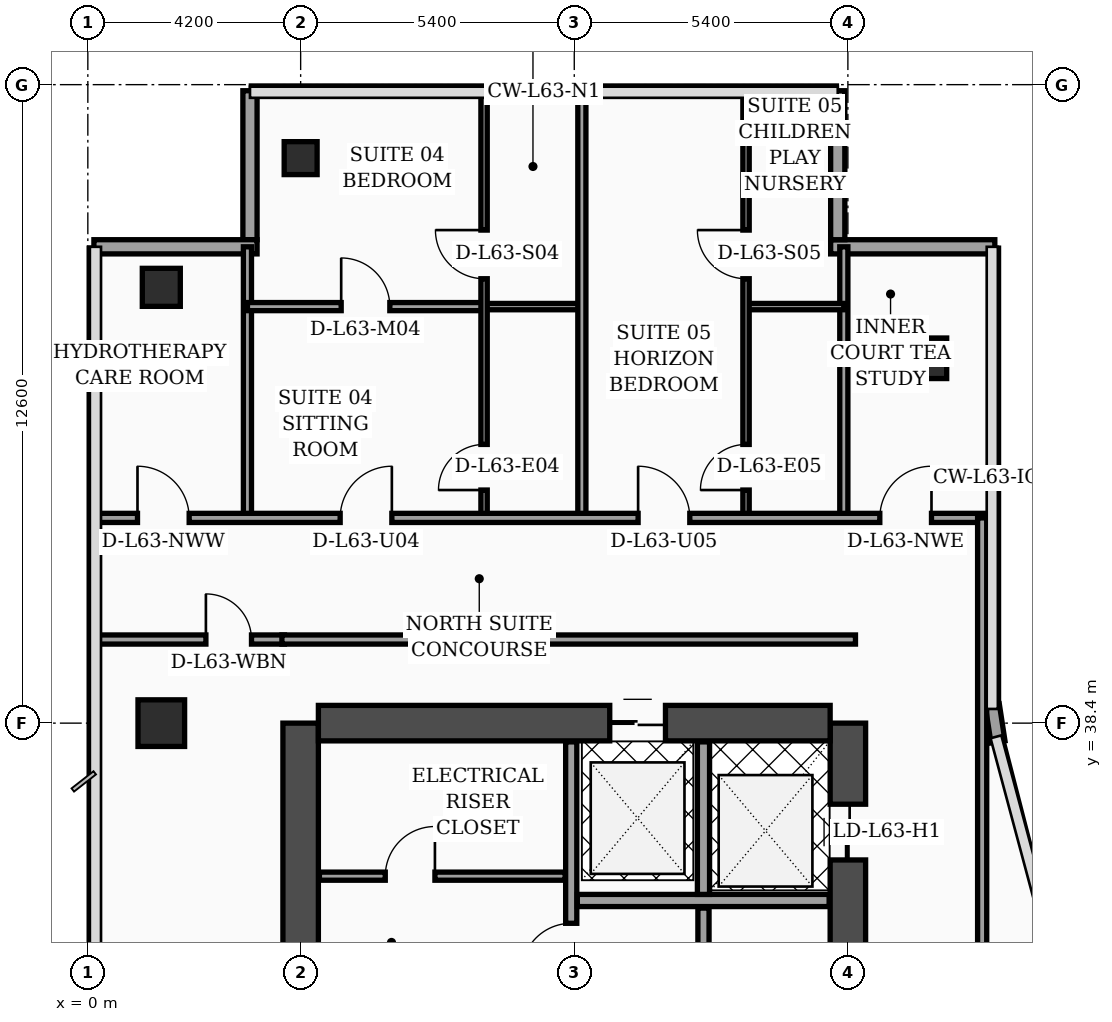
"""IFC4 building model, lengths in metres.
Left out: names, types, materials, properties, quantities, classifications, styles, units other than length and angle.
Written with IfcOpenShell. Run it as: python <this file> out.ifc"""

import sys

from ifc_helpers import new_model, si_unit, direction, frame, frame_2d, origin, origin_2d, place, context, subcontext, project, spatial, rectangle, hollow_rectangle, extrude, element, fill, save


model = new_model("IFC4")
c1 = context("Model", 3, precision=1e-05, world=origin(), true_north=direction((0.0, 1.0)))
c2 = subcontext(c1, "Body", "Model", "MODEL_VIEW")
j1 = project(units=[si_unit("LENGTHUNIT", "METRE"), si_unit("PLANEANGLEUNIT", "RADIAN")], contexts=[c1])
p1 = place(None, origin())
s1 = spatial("IfcSite", under=j1, at=p1, CompositionType="ELEMENT")
p2 = place(p1, origin())
s2 = spatial("IfcBuilding", under=s1, at=p2, CompositionType="ELEMENT")
p3 = place(p2, frame((0.0, 0.0, 255.2)))
s3 = spatial("IfcBuildingStorey", under=s2, at=p3, CompositionType="ELEMENT", Elevation=255.2)
p4 = place(p3, frame((4.2, 16.8, 0.0), z_axis=(0.0, 0.0, 1.0), x_axis=(0.0, 1.0, 0.0)))
e1 = element("IfcWall", 1, at=p4, inside=s3, PredefinedType="SHEAR", context=c2, shape_type="SweptSolid", body=[
    extrude(rectangle(XDim=21.6, YDim=0.7, at=frame_2d((10.8, 0.0))), origin(), (0.0, 0.0, 1.0), 3.56),
])
p5 = place(p3, frame((15.0, 16.8, 0.0), z_axis=(0.0, 0.0, 1.0), x_axis=(0.0, 1.0, 0.0)))
e2 = element("IfcWall", 2, at=p5, inside=s3, PredefinedType="SHEAR", context=c2, shape_type="SweptSolid", body=[
    extrude(rectangle(XDim=21.6, YDim=0.7, at=frame_2d((10.8, 0.0))), origin(), (0.0, 0.0, 1.0), 3.56),
])
p6 = place(p5, frame((8.65, 0.0, 0.0)))
e3 = element("IfcOpeningElement", 3, at=p6, cuts=e2, PredefinedType="OPENING", context=c2, shape_type="SweptSolid", body=[
    extrude(rectangle(XDim=1.1, YDim=2.2, at=frame_2d((0.55, 1.1))), frame((0.0, 0.36, 0.0), z_axis=(0.0, -1.0, 0.0), x_axis=(1.0, 0.0, 0.0)), (0.0, 0.0, 1.0), 0.72),
])
p7 = place(p5, frame((18.9, 0.0, 0.0)))
e4 = element("IfcOpeningElement", 4, at=p7, cuts=e2, PredefinedType="OPENING", context=c2, shape_type="SweptSolid", body=[
    extrude(rectangle(XDim=1.1, YDim=2.2, at=frame_2d((0.55, 1.1))), frame((0.0, 0.36, 0.0), z_axis=(0.0, -1.0, 0.0), x_axis=(1.0, 0.0, 0.0)), (0.0, 0.0, 1.0), 0.72),
])
p8 = place(p3, frame((4.55, 38.4, 0.0), z_axis=(0.0, 0.0, 1.0), x_axis=(1.0, 0.0, 0.0)))
e5 = element("IfcWall", 5, at=p8, inside=s3, PredefinedType="SHEAR", context=c2, shape_type="SweptSolid", body=[
    extrude(rectangle(XDim=10.1, YDim=0.7, at=frame_2d((5.05, 0.0))), origin(), (0.0, 0.0, 1.0), 3.56),
])
p9 = place(p8, frame((5.75, 0.0, 0.0)))
e6 = element("IfcOpeningElement", 6, at=p9, cuts=e5, PredefinedType="OPENING", context=c2, shape_type="SweptSolid", body=[
    extrude(rectangle(XDim=1.1, YDim=2.2, at=frame_2d((0.55, 1.1))), frame((0.0, 0.36, 0.0), z_axis=(0.0, -1.0, 0.0), x_axis=(1.0, 0.0, 0.0)), (0.0, 0.0, 1.0), 0.72),
])
p10 = place(p3, frame((1.45, 38.4, 0.0), z_axis=(0.0, 0.0, 1.0), x_axis=(1.0, 0.0, 0.0)))
e7 = element("IfcColumn", 7, at=p10, inside=s3, PredefinedType="COLUMN", context=c2, shape_type="SweptSolid", body=[
    extrude(rectangle(XDim=0.92, YDim=0.92, at=origin_2d()), origin(), (0.0, 0.0, 1.0), 3.56),
])
p11 = place(p3, frame((1.45, 47.0, 0.0), z_axis=(0.0, 0.0, 1.0), x_axis=(1.0, 0.0, 0.0)))
e8 = element("IfcColumn", 8, at=p11, inside=s3, PredefinedType="COLUMN", context=c2, shape_type="SweptSolid", body=[
    extrude(hollow_rectangle(XDim=0.75, YDim=0.75, WallThickness=0.032, at=origin_2d()), origin(), (0.0, 0.0, 1.0), 3.56),
])
p12 = place(p3, frame((4.2, 49.55, 0.0), z_axis=(0.0, 0.0, 1.0), x_axis=(1.0, 0.0, 0.0)))
e9 = element("IfcColumn", 9, at=p12, inside=s3, PredefinedType="COLUMN", context=c2, shape_type="SweptSolid", body=[
    extrude(hollow_rectangle(XDim=0.65, YDim=0.65, WallThickness=0.028, at=origin_2d()), origin(), (0.0, 0.0, 1.0), 3.56),
])
p13 = place(p3, frame((16.55, 45.6, 0.0), z_axis=(0.0, 0.0, 1.0), x_axis=(1.0, 0.0, 0.0)))
e10 = element("IfcColumn", 10, at=p13, inside=s3, PredefinedType="COLUMN", context=c2, shape_type="SweptSolid", body=[
    extrude(rectangle(XDim=0.8, YDim=0.8, at=origin_2d()), origin(), (0.0, 0.0, 1.0), 3.56),
])
p14 = place(p3, frame((17.962, 38.03, 0.0), z_axis=(0.0, 0.0, 1.0), x_axis=(-0.15141125477, 0.988470855377, 0.0)))
e11 = element("IfcWall", 11, at=p14, inside=s3, PredefinedType="SOLIDWALL", context=c2, shape_type="SweptSolid", body=[
    extrude(rectangle(XDim=0.739, YDim=0.28, at=frame_2d((0.369, 0.0))), origin(), (0.0, 0.0, 1.0), 3.56),
])
p15 = place(p3, frame((17.9, 47.8, 0.0), z_axis=(0.0, 0.0, 1.0), x_axis=(-1.0, 0.0, 0.0)))
e12 = element("IfcWall", 12, at=p15, inside=s3, PredefinedType="SOLIDWALL", context=c2, shape_type="SweptSolid", body=[
    extrude(rectangle(XDim=3.24, YDim=0.28, at=frame_2d((1.62, 0.0))), origin(), (0.0, 0.0, 1.0), 3.56),
])
p16 = place(p3, frame((14.8, 47.94, 0.0), z_axis=(0.0, 0.0, 1.0), x_axis=(0.0, 1.0, 0.0)))
e13 = element("IfcWall", 13, at=p16, inside=s3, PredefinedType="SOLIDWALL", context=c2, shape_type="SweptSolid", body=[
    extrude(rectangle(XDim=2.94, YDim=0.28, at=frame_2d((1.47, 0.0))), origin(), (0.0, 0.0, 1.0), 3.56),
])
p17 = place(p3, frame((3.2, 50.88, 0.0), z_axis=(0.0, 0.0, 1.0), x_axis=(0.0, -1.0, 0.0)))
e14 = element("IfcWall", 14, at=p17, inside=s3, PredefinedType="SOLIDWALL", context=c2, shape_type="SweptSolid", body=[
    extrude(rectangle(XDim=2.94, YDim=0.28, at=frame_2d((1.47, 0.0))), origin(), (0.0, 0.0, 1.0), 3.09),
])
p18 = place(p3, frame((3.34, 47.8, 0.0), z_axis=(0.0, 0.0, 1.0), x_axis=(-1.0, 0.0, 0.0)))
e15 = element("IfcWall", 15, at=p18, inside=s3, PredefinedType="SOLIDWALL", context=c2, shape_type="SweptSolid", body=[
    extrude(rectangle(XDim=3.22, YDim=0.28, at=frame_2d((1.61, 0.0))), origin(), (0.0, 0.0, 1.0), 3.09),
])
p19 = place(p3, frame((4.57, 35.38, 0.0), z_axis=(0.0, 0.0, 1.0), x_axis=(1.0, 0.0, 0.0)))
e16 = element("IfcWall", 16, at=p19, inside=s3, PredefinedType="PARTITIONING", context=c2, shape_type="SweptSolid", body=[
    extrude(rectangle(XDim=4.85, YDim=0.16, at=frame_2d((2.425, 0.0))), origin(), (0.0, 0.0, 1.0), 3.56),
])
p20 = place(p19, frame((1.3, 0.0, 0.0)))
e17 = element("IfcOpeningElement", 17, at=p20, cuts=e16, PredefinedType="OPENING", context=c2, shape_type="SweptSolid", body=[
    extrude(rectangle(XDim=0.98, YDim=2.15, at=frame_2d((0.49, 1.075))), frame((0.0, 0.09, 0.0), z_axis=(0.0, -1.0, 0.0), x_axis=(1.0, 0.0, 0.0)), (0.0, 0.0, 1.0), 0.18),
])
p21 = place(p3, frame((9.54, 32.92, 0.0), z_axis=(0.0, 0.0, 1.0), x_axis=(0.0, 1.0, 0.0)))
e18 = element("IfcWall", 18, at=p21, inside=s3, PredefinedType="SOLIDWALL", context=c2, shape_type="SweptSolid", body=[
    extrude(rectangle(XDim=5.11, YDim=0.22, at=frame_2d((2.555, 0.0))), origin(), (0.0, 0.0, 1.0), 3.56),
])
p22 = place(p21, frame((0.55, 0.0, 0.0)))
e19 = element("IfcOpeningElement", 19, at=p22, cuts=e18, PredefinedType="OPENING", context=c2, shape_type="SweptSolid", body=[
    extrude(rectangle(XDim=0.98, YDim=2.15, at=frame_2d((0.49, 1.075))), frame((0.0, 0.12, 0.0), z_axis=(0.0, -1.0, 0.0), x_axis=(1.0, 0.0, 0.0)), (0.0, 0.0, 1.0), 0.24),
])
p23 = place(p3, frame((12.15, 27.0, 0.0), z_axis=(0.0, 0.0, 1.0), x_axis=(0.0, 1.0, 0.0)))
e20 = element("IfcWall", 20, at=p23, inside=s3, PredefinedType="SOLIDWALL", context=c2, shape_type="SweptSolid", body=[
    extrude(rectangle(XDim=7.75, YDim=0.22, at=frame_2d((3.875, 0.0))), origin(), (0.0, 0.0, 1.0), 3.56),
])
p24 = place(p23, frame((0.8, 0.0, 0.0)))
e21 = element("IfcOpeningElement", 21, at=p24, cuts=e20, PredefinedType="OPENING", context=c2, shape_type="SweptSolid", body=[
    extrude(rectangle(XDim=0.98, YDim=2.15, at=frame_2d((0.49, 1.075))), frame((0.0, 0.12, 0.0), z_axis=(0.0, -1.0, 0.0), x_axis=(1.0, 0.0, 0.0)), (0.0, 0.0, 1.0), 0.24),
])
p25 = place(p3, frame((9.66, 34.9, 0.0), z_axis=(0.0, 0.0, 1.0), x_axis=(1.0, 0.0, 0.0)))
e22 = element("IfcWall", 22, at=p25, inside=s3, PredefinedType="SOLIDWALL", context=c2, shape_type="SweptSolid", body=[
    extrude(rectangle(XDim=4.97, YDim=0.24, at=frame_2d((2.485, 0.0))), origin(), (0.0, 0.0, 1.0), 3.56),
])
p26 = place(p3, frame((12.15, 35.02, 0.0), z_axis=(0.0, 0.0, 1.0), x_axis=(0.0, 1.0, 0.0)))
e23 = element("IfcWall", 23, at=p26, inside=s3, PredefinedType="SOLIDWALL", context=c2, shape_type="SweptSolid", body=[
    extrude(rectangle(XDim=3.01, YDim=0.24, at=frame_2d((1.505, 0.0))), origin(), (0.0, 0.0, 1.0), 3.56),
])
p27 = place(p3, frame((0.08, 40.05, 0.0), z_axis=(0.0, 0.0, 1.0), x_axis=(1.0, 0.0, 0.0)))
e24 = element("IfcWall", 24, at=p27, inside=s3, PredefinedType="PARTITIONING", context=c2, shape_type="SweptSolid", body=[
    extrude(rectangle(XDim=3.8, YDim=0.18, at=frame_2d((1.9, 0.0))), origin(), (0.0, 0.0, 1.0), 2.99),
])
p28 = place(p27, frame((2.25, 0.0, 0.0)))
e25 = element("IfcOpeningElement", 25, at=p28, cuts=e24, PredefinedType="OPENING", context=c2, shape_type="SweptSolid", body=[
    extrude(rectangle(XDim=0.9, YDim=2.15, at=frame_2d((0.45, 1.075))), frame((0.0, 0.1, 0.0), z_axis=(0.0, -1.0, 0.0), x_axis=(1.0, 0.0, 0.0)), (0.0, 0.0, 1.0), 0.2),
])
p29 = place(p3, frame((3.15, 42.45, 0.0), z_axis=(0.0, 0.0, 1.0), x_axis=(0.0, 1.0, 0.0)))
e26 = element("IfcWall", 26, at=p29, inside=s3, PredefinedType="PARTITIONING", context=c2, shape_type="SweptSolid", body=[
    extrude(rectangle(XDim=5.35, YDim=0.16, at=frame_2d((2.675, 0.0))), origin(), (0.0, 0.0, 1.0), 3.14),
])
p30 = place(p3, frame((14.92, 42.45, 0.0), z_axis=(0.0, 0.0, 1.0), x_axis=(0.0, 1.0, 0.0)))
e27 = element("IfcWall", 27, at=p30, inside=s3, PredefinedType="PARTITIONING", context=c2, shape_type="SweptSolid", body=[
    extrude(rectangle(XDim=5.35, YDim=0.16, at=frame_2d((2.675, 0.0))), origin(), (0.0, 0.0, 1.0), 3.09),
])
p31 = place(p3, frame((7.82, 46.62, 0.0), z_axis=(0.0, 0.0, 1.0), x_axis=(1.0, 0.0, 0.0)))
e28 = element("IfcWall", 28, at=p31, inside=s3, PredefinedType="PARTITIONING", context=c2, shape_type="SweptSolid", body=[
    extrude(rectangle(XDim=1.93, YDim=0.125, at=frame_2d((0.965, 0.0))), origin(), (0.0, 0.0, 1.0), 3.56),
])
p32 = place(p3, frame((3.15, 46.62, 0.0), z_axis=(0.0, 0.0, 1.0), x_axis=(1.0, 0.0, 0.0)))
e29 = element("IfcWall", 29, at=p32, inside=s3, PredefinedType="PARTITIONING", context=c2, shape_type="SweptSolid", body=[
    extrude(rectangle(XDim=4.67, YDim=0.16, at=frame_2d((2.335, 0.0))), origin(), (0.0, 0.0, 1.0), 2.99),
])
p33 = place(p32, frame((1.85, 0.0, 0.0)))
e30 = element("IfcOpeningElement", 30, at=p33, cuts=e29, PredefinedType="OPENING", context=c2, shape_type="SweptSolid", body=[
    extrude(rectangle(XDim=0.96, YDim=2.2, at=frame_2d((0.48, 1.1))), frame((0.0, 0.09, 0.0), z_axis=(0.0, -1.0, 0.0), x_axis=(1.0, 0.0, 0.0)), (0.0, 0.0, 1.0), 0.18),
])
p34 = place(p3, frame((7.82, 42.45, 0.0), z_axis=(0.0, 0.0, 1.0), x_axis=(0.0, 1.0, 0.0)))
e31 = element("IfcWall", 31, at=p34, inside=s3, PredefinedType="PARTITIONING", context=c2, shape_type="SweptSolid", body=[
    extrude(rectangle(XDim=8.49, YDim=0.125, at=frame_2d((4.245, 0.0))), origin(), (0.0, 0.0, 1.0), 3.09),
])
p35 = place(p34, frame((0.55, 0.0, 0.0)))
e32 = element("IfcOpeningElement", 32, at=p35, cuts=e31, PredefinedType="OPENING", context=c2, shape_type="SweptSolid", body=[
    extrude(rectangle(XDim=0.9, YDim=2.15, at=frame_2d((0.45, 1.075))), frame((0.0, 0.073, 0.0), z_axis=(0.0, -1.0, 0.0), x_axis=(1.0, 0.0, 0.0)), (0.0, 0.0, 1.0), 0.145),
])
p36 = place(p34, frame((4.72, 0.0, 0.0)))
e33 = element("IfcOpeningElement", 33, at=p36, cuts=e31, PredefinedType="OPENING", context=c2, shape_type="SweptSolid", body=[
    extrude(rectangle(XDim=0.96, YDim=2.2, at=frame_2d((0.48, 1.1))), frame((0.0, 0.073, 0.0), z_axis=(0.0, -1.0, 0.0), x_axis=(1.0, 0.0, 0.0)), (0.0, 0.0, 1.0), 0.145),
])
p37 = place(p3, frame((12.99, 46.62, 0.0), z_axis=(0.0, 0.0, 1.0), x_axis=(1.0, 0.0, 0.0)))
e34 = element("IfcWall", 34, at=p37, inside=s3, PredefinedType="PARTITIONING", context=c2, shape_type="SweptSolid", body=[
    extrude(rectangle(XDim=1.93, YDim=0.125, at=frame_2d((0.965, 0.0))), origin(), (0.0, 0.0, 1.0), 3.09),
])
p38 = place(p3, frame((12.99, 42.45, 0.0), z_axis=(0.0, 0.0, 1.0), x_axis=(0.0, 1.0, 0.0)))
e35 = element("IfcWall", 35, at=p38, inside=s3, PredefinedType="PARTITIONING", context=c2, shape_type="SweptSolid", body=[
    extrude(rectangle(XDim=8.49, YDim=0.125, at=frame_2d((4.245, 0.0))), origin(), (0.0, 0.0, 1.0), 3.09),
])
p39 = place(p38, frame((0.55, 0.0, 0.0)))
e36 = element("IfcOpeningElement", 36, at=p39, cuts=e35, PredefinedType="OPENING", context=c2, shape_type="SweptSolid", body=[
    extrude(rectangle(XDim=0.9, YDim=2.15, at=frame_2d((0.45, 1.075))), frame((0.0, 0.073, 0.0), z_axis=(0.0, -1.0, 0.0), x_axis=(1.0, 0.0, 0.0)), (0.0, 0.0, 1.0), 0.145),
])
p40 = place(p38, frame((4.72, 0.0, 0.0)))
e37 = element("IfcOpeningElement", 37, at=p40, cuts=e35, PredefinedType="OPENING", context=c2, shape_type="SweptSolid", body=[
    extrude(rectangle(XDim=0.96, YDim=2.2, at=frame_2d((0.48, 1.1))), frame((0.0, 0.073, 0.0), z_axis=(0.0, -1.0, 0.0), x_axis=(1.0, 0.0, 0.0)), (0.0, 0.0, 1.0), 0.145),
])
p41 = place(p3, frame((9.75, 42.45, 0.0), z_axis=(0.0, 0.0, 1.0), x_axis=(0.0, 1.0, 0.0)))
e38 = element("IfcWall", 38, at=p41, inside=s3, PredefinedType="PARTITIONING", context=c2, shape_type="SweptSolid", body=[
    extrude(rectangle(XDim=8.49, YDim=0.16, at=frame_2d((4.245, 0.0))), origin(), (0.0, 0.0, 1.0), 3.09),
])
p42 = place(p3, frame((0.08, 42.45, 0.0), z_axis=(0.0, 0.0, 1.0), x_axis=(1.0, 0.0, 0.0)))
e39 = element("IfcWall", 39, at=p42, inside=s3, PredefinedType="PARTITIONING", context=c2, shape_type="SweptSolid", body=[
    extrude(rectangle(XDim=17.77, YDim=0.18, at=frame_2d((8.885, 0.0))), origin(), (0.0, 0.0, 1.0), 2.99),
])
p43 = place(p42, frame((0.9, 0.0, 0.0)))
e40 = element("IfcOpeningElement", 40, at=p43, cuts=e39, PredefinedType="OPENING", context=c2, shape_type="SweptSolid", body=[
    extrude(rectangle(XDim=1.02, YDim=2.2, at=frame_2d((0.51, 1.1))), frame((0.0, 0.1, 0.0), z_axis=(0.0, -1.0, 0.0), x_axis=(1.0, 0.0, 0.0)), (0.0, 0.0, 1.0), 0.2),
])
p44 = place(p42, frame((4.9, 0.0, 0.0)))
e41 = element("IfcOpeningElement", 41, at=p44, cuts=e39, PredefinedType="OPENING", context=c2, shape_type="SweptSolid", body=[
    extrude(rectangle(XDim=1.02, YDim=2.2, at=frame_2d((0.51, 1.1))), frame((0.0, 0.1, 0.0), z_axis=(0.0, -1.0, 0.0), x_axis=(1.0, 0.0, 0.0)), (0.0, 0.0, 1.0), 0.2),
])
p45 = place(p42, frame((10.78, 0.0, 0.0)))
e42 = element("IfcOpeningElement", 42, at=p45, cuts=e39, PredefinedType="OPENING", context=c2, shape_type="SweptSolid", body=[
    extrude(rectangle(XDim=1.02, YDim=2.2, at=frame_2d((0.51, 1.1))), frame((0.0, 0.1, 0.0), z_axis=(0.0, -1.0, 0.0), x_axis=(1.0, 0.0, 0.0)), (0.0, 0.0, 1.0), 0.2),
])
p46 = place(p42, frame((15.55, 0.0, 0.0)))
e43 = element("IfcOpeningElement", 43, at=p46, cuts=e39, PredefinedType="OPENING", context=c2, shape_type="SweptSolid", body=[
    extrude(rectangle(XDim=1.02, YDim=2.2, at=frame_2d((0.51, 1.1))), frame((0.0, 0.1, 0.0), z_axis=(0.0, -1.0, 0.0), x_axis=(1.0, 0.0, 0.0)), (0.0, 0.0, 1.0), 0.2),
])
p47 = place(p3, frame((17.65, 24.3, 0.0), z_axis=(0.0, 0.0, 1.0), x_axis=(0.0, 1.0, 0.0)))
e44 = element("IfcWall", 44, at=p47, inside=s3, PredefinedType="PARTITIONING", context=c2, shape_type="SweptSolid", body=[
    extrude(rectangle(XDim=18.15, YDim=0.18, at=frame_2d((9.075, 0.0))), origin(), (0.0, 0.0, 1.0), 2.99),
])
p48 = place(p47, frame((3.2, 0.0, 0.0)))
e45 = element("IfcOpeningElement", 45, at=p48, cuts=e44, PredefinedType="OPENING", context=c2, shape_type="SweptSolid", body=[
    extrude(rectangle(XDim=1.02, YDim=2.2, at=frame_2d((0.51, 1.1))), frame((0.0, 0.1, 0.0), z_axis=(0.0, -1.0, 0.0), x_axis=(1.0, 0.0, 0.0)), (0.0, 0.0, 1.0), 0.2),
])
p49 = place(p3, frame((3.83, 40.05, 0.0), z_axis=(0.0, 0.0, 1.0), x_axis=(1.0, 0.0, 0.0)))
e46 = element("IfcWall", 46, at=p49, inside=s3, PredefinedType="PARTITIONING", context=c2, shape_type="SweptSolid", body=[
    extrude(rectangle(XDim=11.32, YDim=0.18, at=frame_2d((5.66, 0.0))), origin(), (0.0, 0.0, 1.0), 2.99),
])
p50 = place(p20, origin())
e47 = element("IfcDoor", 47, at=p50, inside=s3, OperationType="SINGLE_SWING_RIGHT", PredefinedType="DOOR", context=c2, shape_type="SweptSolid", body=[
    extrude(rectangle(XDim=0.98, YDim=2.15, at=frame_2d((0.49, 1.075))), frame((0.0, 0.025, 0.0), z_axis=(0.0, -1.0, 0.0), x_axis=(1.0, 0.0, 0.0)), (0.0, 0.0, 1.0), 0.05),
])
fill(e17, e47)
p51 = place(p22, origin())
e48 = element("IfcDoor", 48, at=p51, inside=s3, OperationType="SINGLE_SWING_LEFT", PredefinedType="DOOR", context=c2, shape_type="SweptSolid", body=[
    extrude(rectangle(XDim=0.98, YDim=2.15, at=frame_2d((0.49, 1.075))), frame((0.0, 0.025, 0.0), z_axis=(0.0, -1.0, 0.0), x_axis=(1.0, 0.0, 0.0)), (0.0, 0.0, 1.0), 0.05),
])
fill(e19, e48)
p52 = place(p28, origin())
e49 = element("IfcDoor", 49, at=p52, inside=s3, OperationType="SINGLE_SWING_LEFT", PredefinedType="DOOR", context=c2, shape_type="SweptSolid", body=[
    extrude(rectangle(XDim=0.9, YDim=2.15, at=frame_2d((0.45, 1.075))), frame((0.0, 0.025, 0.0), z_axis=(0.0, -1.0, 0.0), x_axis=(1.0, 0.0, 0.0)), (0.0, 0.0, 1.0), 0.05),
])
fill(e25, e49)
p53 = place(p33, origin())
e50 = element("IfcDoor", 50, at=p53, inside=s3, OperationType="SINGLE_SWING_LEFT", PredefinedType="DOOR", context=c2, shape_type="SweptSolid", body=[
    extrude(rectangle(XDim=0.96, YDim=2.2, at=frame_2d((0.48, 1.1))), frame((0.0, 0.025, 0.0), z_axis=(0.0, -1.0, 0.0), x_axis=(1.0, 0.0, 0.0)), (0.0, 0.0, 1.0), 0.05),
])
fill(e30, e50)
p54 = place(p35, origin())
e51 = element("IfcDoor", 51, at=p54, inside=s3, OperationType="SINGLE_SWING_LEFT", PredefinedType="DOOR", context=c2, shape_type="SweptSolid", body=[
    extrude(rectangle(XDim=0.9, YDim=2.15, at=frame_2d((0.45, 1.075))), frame((0.0, 0.025, 0.0), z_axis=(0.0, -1.0, 0.0), x_axis=(1.0, 0.0, 0.0)), (0.0, 0.0, 1.0), 0.05),
])
fill(e32, e51)
p55 = place(p36, origin())
e52 = element("IfcDoor", 52, at=p55, inside=s3, OperationType="SINGLE_SWING_RIGHT", PredefinedType="DOOR", context=c2, shape_type="SweptSolid", body=[
    extrude(rectangle(XDim=0.96, YDim=2.2, at=frame_2d((0.48, 1.1))), frame((0.0, 0.025, 0.0), z_axis=(0.0, -1.0, 0.0), x_axis=(1.0, 0.0, 0.0)), (0.0, 0.0, 1.0), 0.05),
])
fill(e33, e52)
p56 = place(p39, origin())
e53 = element("IfcDoor", 53, at=p56, inside=s3, OperationType="SINGLE_SWING_LEFT", PredefinedType="DOOR", context=c2, shape_type="SweptSolid", body=[
    extrude(rectangle(XDim=0.9, YDim=2.15, at=frame_2d((0.45, 1.075))), frame((0.0, 0.025, 0.0), z_axis=(0.0, -1.0, 0.0), x_axis=(1.0, 0.0, 0.0)), (0.0, 0.0, 1.0), 0.05),
])
fill(e36, e53)
p57 = place(p40, origin())
e54 = element("IfcDoor", 54, at=p57, inside=s3, OperationType="SINGLE_SWING_RIGHT", PredefinedType="DOOR", context=c2, shape_type="SweptSolid", body=[
    extrude(rectangle(XDim=0.96, YDim=2.2, at=frame_2d((0.48, 1.1))), frame((0.0, 0.025, 0.0), z_axis=(0.0, -1.0, 0.0), x_axis=(1.0, 0.0, 0.0)), (0.0, 0.0, 1.0), 0.05),
])
fill(e37, e54)
p58 = place(p43, origin())
e55 = element("IfcDoor", 55, at=p58, inside=s3, OperationType="SINGLE_SWING_LEFT", PredefinedType="DOOR", context=c2, shape_type="SweptSolid", body=[
    extrude(rectangle(XDim=1.02, YDim=2.2, at=frame_2d((0.51, 1.1))), frame((0.0, 0.025, 0.0), z_axis=(0.0, -1.0, 0.0), x_axis=(1.0, 0.0, 0.0)), (0.0, 0.0, 1.0), 0.05),
])
fill(e40, e55)
p59 = place(p44, origin())
e56 = element("IfcDoor", 56, at=p59, inside=s3, OperationType="SINGLE_SWING_RIGHT", PredefinedType="DOOR", context=c2, shape_type="SweptSolid", body=[
    extrude(rectangle(XDim=1.02, YDim=2.2, at=frame_2d((0.51, 1.1))), frame((0.0, 0.025, 0.0), z_axis=(0.0, -1.0, 0.0), x_axis=(1.0, 0.0, 0.0)), (0.0, 0.0, 1.0), 0.05),
])
fill(e41, e56)
p60 = place(p45, origin())
e57 = element("IfcDoor", 57, at=p60, inside=s3, OperationType="SINGLE_SWING_LEFT", PredefinedType="DOOR", context=c2, shape_type="SweptSolid", body=[
    extrude(rectangle(XDim=1.02, YDim=2.2, at=frame_2d((0.51, 1.1))), frame((0.0, 0.025, 0.0), z_axis=(0.0, -1.0, 0.0), x_axis=(1.0, 0.0, 0.0)), (0.0, 0.0, 1.0), 0.05),
])
fill(e42, e57)
p61 = place(p46, origin())
e58 = element("IfcDoor", 58, at=p61, inside=s3, OperationType="SINGLE_SWING_RIGHT", PredefinedType="DOOR", context=c2, shape_type="SweptSolid", body=[
    extrude(rectangle(XDim=1.02, YDim=2.2, at=frame_2d((0.51, 1.1))), frame((0.0, 0.025, 0.0), z_axis=(0.0, -1.0, 0.0), x_axis=(1.0, 0.0, 0.0)), (0.0, 0.0, 1.0), 0.05),
])
fill(e43, e58)
p62 = place(p7, origin())
e59 = element("IfcDoor", 59, at=p62, inside=s3, OperationType="DOUBLE_DOOR_SLIDING", PredefinedType="DOOR", context=c2, shape_type="SweptSolid", body=[
    extrude(rectangle(XDim=1.1, YDim=2.2, at=frame_2d((0.55, 1.1))), frame((0.0, 0.025, 0.0), z_axis=(0.0, -1.0, 0.0), x_axis=(1.0, 0.0, 0.0)), (0.0, 0.0, 1.0), 0.05),
])
fill(e4, e59)
p63 = place(p9, origin())
e60 = element("IfcDoor", 60, at=p63, inside=s3, OperationType="DOUBLE_DOOR_SLIDING", PredefinedType="DOOR", context=c2, shape_type="SweptSolid", body=[
    extrude(rectangle(XDim=1.1, YDim=2.2, at=frame_2d((0.55, 1.1))), frame((0.0, 0.025, 0.0), z_axis=(0.0, -1.0, 0.0), x_axis=(1.0, 0.0, 0.0)), (0.0, 0.0, 1.0), 0.05),
])
fill(e6, e60)
save(model, sys.argv[1])
